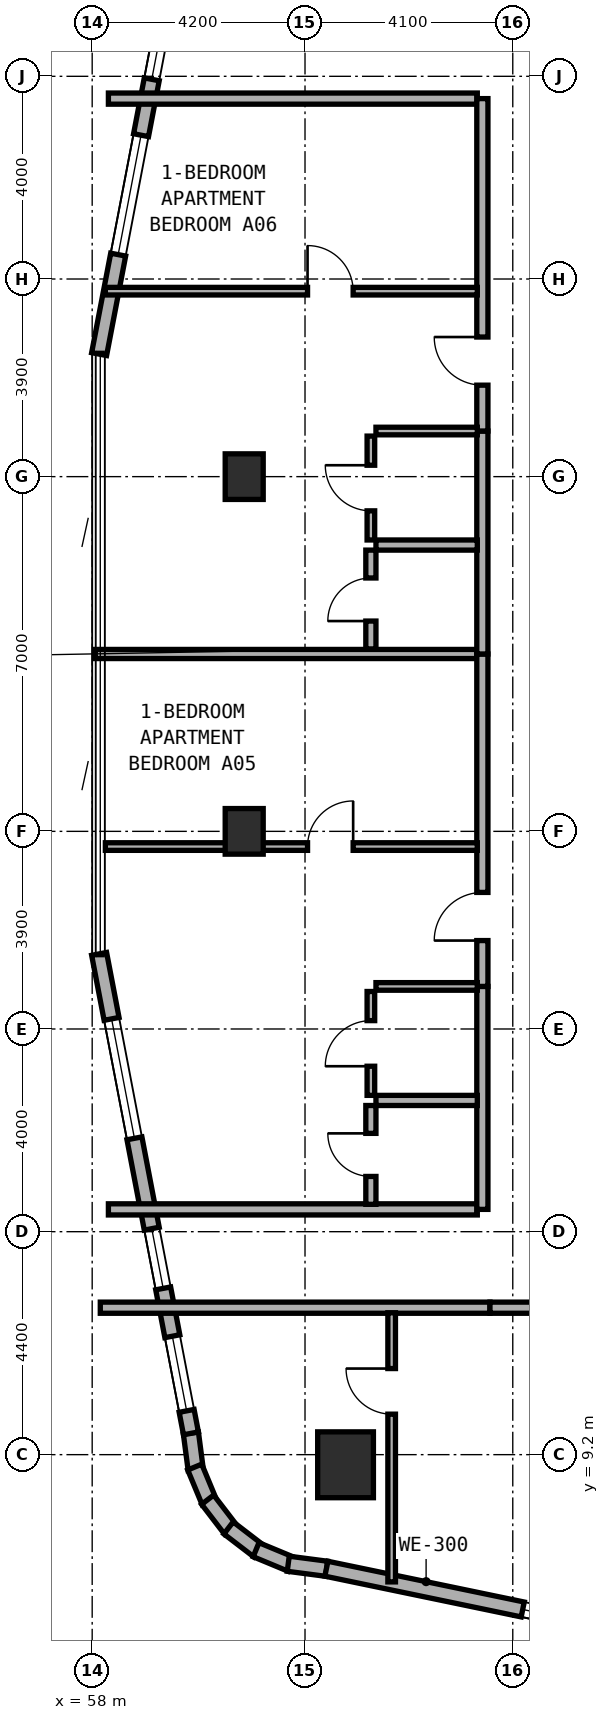
"""IFC4 building model, lengths in metres.
Left out: names, types, materials, properties, quantities, classifications, styles, units other than length and angle.
Written with IfcOpenShell. Run it as: python <this file> out.ifc"""

import sys

from ifc_helpers import new_model, si_unit, direction, frame, frame_2d, origin, origin_2d, place, context, subcontext, project, spatial, rectangle, extrude, element, fill, save


model = new_model("IFC4")
c1 = context("Model", 3, precision=1e-05, world=origin(), true_north=direction((0.0, 1.0)))
c2 = subcontext(c1, "Body", "Model", "MODEL_VIEW")
j1 = project(units=[si_unit("LENGTHUNIT", "METRE"), si_unit("PLANEANGLEUNIT", "RADIAN")], contexts=[c1])
p1 = place(None, origin())
s1 = spatial("IfcSite", under=j1, at=p1, CompositionType="ELEMENT")
p2 = place(p1, origin())
s2 = spatial("IfcBuilding", under=s1, at=p2, CompositionType="ELEMENT")
p3 = place(p2, frame((0.0, 0.0, 45.0)))
s3 = spatial("IfcBuildingStorey", under=s2, at=p3, CompositionType="ELEMENT", Elevation=45.0)
for number, where, z_axis, x_axis in (
    (1, (61.0, 21.5, 0.0), (0.0, 0.0, 1.0), (1.0, 0.0, 0.0)),
    (2, (61.0, 28.5, 0.0), (0.0, 0.0, 1.0), (1.0, 0.0, 0.0)),
):
    element("IfcColumn", number, at=place(p3, frame(where, z_axis=z_axis, x_axis=x_axis)), inside=s3, PredefinedType="COLUMN", context=c2, shape_type="SweptSolid", body=[
        extrude(rectangle(XDim=0.75, YDim=0.9, at=origin_2d()), origin(), (0.0, 0.0, 1.0), 3.5),
    ])
p4 = place(p3, frame((63.0, 9.0, 0.0), z_axis=(0.0, 0.0, 1.0), x_axis=(1.0, 0.0, 0.0)))
e3 = element("IfcColumn", 3, at=p4, inside=s3, PredefinedType="COLUMN", context=c2, shape_type="SweptSolid", body=[
    extrude(rectangle(XDim=1.1, YDim=1.3, at=origin_2d()), origin(), (0.0, 0.0, 1.0), 3.5),
])
p5 = place(p3, frame((59.948, 9.627, 0.0), z_axis=(0.0, 0.0, 1.0), x_axis=(0.130255288807, -0.991480488834, 0.0)))
e4 = element("IfcWall", 4, at=p5, inside=s3, PredefinedType="STANDARD", context=c2, shape_type="SweptSolid", body=[
    extrude(rectangle(XDim=0.729, YDim=0.3, at=frame_2d((0.365, 0.0))), origin(), (0.0, 0.0, 1.0), 3.25),
])
for number, where, z_axis, x_axis in (
    (5, (60.024, 8.955, 0.0), (0.0, 0.0, 1.0), (0.384, -0.924, 0.0)),
    (6, (60.279, 8.311, 0.0), (0.0, 0.0, 1.0), (0.608, -0.794, 0.0)),
    (7, (60.691, 7.754, 0.0), (0.0, 0.0, 1.0), (0.794, -0.608, 0.0)),
    (8, (61.234, 7.324, 0.0), (0.0, 0.0, 1.0), (0.924, -0.383, 0.0)),
):
    element("IfcWall", number, at=place(p3, frame(where, z_axis=z_axis, x_axis=x_axis)), inside=s3, PredefinedType="STANDARD", context=c2, shape_type="SweptSolid", body=[
        extrude(rectangle(XDim=0.746, YDim=0.3, at=frame_2d((0.373, 0.0))), origin(), (0.0, 0.0, 1.0), 3.25),
    ])
p6 = place(p3, frame((61.869, 7.047, 0.0), z_axis=(0.0, 0.0, 1.0), x_axis=(0.991559404866, -0.129653178221, 0.0)))
e9 = element("IfcWall", 9, at=p6, inside=s3, PredefinedType="STANDARD", context=c2, shape_type="SweptSolid", body=[
    extrude(rectangle(XDim=0.764, YDim=0.3, at=frame_2d((0.382, 0.0))), origin(), (0.0, 0.0, 1.0), 3.25),
])
p7 = place(p3, frame((62.622, 6.949, 0.0), z_axis=(0.0, 0.0, 1.0), x_axis=(0.979127260729, -0.203248142175, 0.0)))
e10 = element("IfcWall", 10, at=p7, inside=s3, PredefinedType="STANDARD", context=c2, shape_type="SweptSolid", body=[
    extrude(rectangle(XDim=8.92, YDim=0.3, at=frame_2d((4.46, 0.0))), origin(), (0.0, 0.0, 1.0), 3.25),
])
p8 = place(p7, frame((3.957, 0.0, 0.8)))
e11 = element("IfcOpeningElement", 11, at=p8, cuts=e10, PredefinedType="OPENING", context=c2, shape_type="SweptSolid", body=[
    extrude(rectangle(XDim=2.4, YDim=1.6, at=frame_2d((1.2, 0.8))), frame((0.0, 0.16, 0.0), z_axis=(0.0, -1.0, 0.0), x_axis=(1.0, 0.0, 0.0)), (0.0, 0.0, 1.0), 0.32),
])
p9 = place(p3, frame((59.949, 40.38, 0.0), z_axis=(0.0, 0.0, 1.0), x_axis=(-0.188087874316, -0.982152203854, 0.0)))
e12 = element("IfcWall", 12, at=p9, inside=s3, PredefinedType="STANDARD", context=c2, shape_type="SweptSolid", body=[
    extrude(rectangle(XDim=9.634, YDim=0.3, at=frame_2d((4.817, 0.0))), origin(), (0.0, 0.0, 1.0), 3.25),
])
p10 = place(p9, frame((0.452, 0.0, 0.85)))
e13 = element("IfcOpeningElement", 13, at=p10, cuts=e12, PredefinedType="OPENING", context=c2, shape_type="SweptSolid", body=[
    extrude(rectangle(XDim=1.5, YDim=1.5, at=frame_2d((0.75, 0.75))), frame((0.0, 0.16, 0.0), z_axis=(0.0, -1.0, 0.0), x_axis=(1.0, 0.0, 0.0)), (0.0, 0.0, 1.0), 0.32),
])
p11 = place(p9, frame((2.913, 0.0, 0.85)))
e14 = element("IfcOpeningElement", 14, at=p11, cuts=e12, PredefinedType="OPENING", context=c2, shape_type="SweptSolid", body=[
    extrude(rectangle(XDim=1.2, YDim=1.5, at=frame_2d((0.6, 0.75))), frame((0.0, 0.16, 0.0), z_axis=(0.0, -1.0, 0.0), x_axis=(1.0, 0.0, 0.0)), (0.0, 0.0, 1.0), 0.32),
])
p12 = place(p9, frame((5.235, 0.0, 0.8)))
e15 = element("IfcOpeningElement", 15, at=p12, cuts=e12, PredefinedType="OPENING", context=c2, shape_type="SweptSolid", body=[
    extrude(rectangle(XDim=2.4, YDim=1.6, at=frame_2d((1.2, 0.8))), frame((0.0, 0.16, 0.0), z_axis=(0.0, -1.0, 0.0), x_axis=(1.0, 0.0, 0.0)), (0.0, 0.0, 1.0), 0.32),
])
p13 = place(p3, frame((58.137, 19.082, 0.0), z_axis=(0.0, 0.0, 1.0), x_axis=(0.188087874316, -0.982152203854, 0.0)))
e16 = element("IfcWall", 16, at=p13, inside=s3, PredefinedType="STANDARD", context=c2, shape_type="SweptSolid", body=[
    extrude(rectangle(XDim=9.634, YDim=0.3, at=frame_2d((4.817, 0.0))), origin(), (0.0, 0.0, 1.0), 3.25),
])
p14 = place(p13, frame((1.306, 0.0, 0.8)))
e17 = element("IfcOpeningElement", 17, at=p14, cuts=e16, PredefinedType="OPENING", context=c2, shape_type="SweptSolid", body=[
    extrude(rectangle(XDim=2.4, YDim=1.6, at=frame_2d((1.2, 0.8))), frame((0.0, 0.16, 0.0), z_axis=(0.0, -1.0, 0.0), x_axis=(1.0, 0.0, 0.0)), (0.0, 0.0, 1.0), 0.32),
])
p15 = place(p13, frame((5.521, 0.0, 0.85)))
e18 = element("IfcOpeningElement", 18, at=p15, cuts=e16, PredefinedType="OPENING", context=c2, shape_type="SweptSolid", body=[
    extrude(rectangle(XDim=1.2, YDim=1.5, at=frame_2d((0.6, 0.75))), frame((0.0, 0.16, 0.0), z_axis=(0.0, -1.0, 0.0), x_axis=(1.0, 0.0, 0.0)), (0.0, 0.0, 1.0), 0.32),
])
p16 = place(p13, frame((7.682, 0.0, 0.85)))
e19 = element("IfcOpeningElement", 19, at=p16, cuts=e16, PredefinedType="OPENING", context=c2, shape_type="SweptSolid", body=[
    extrude(rectangle(XDim=1.5, YDim=1.5, at=frame_2d((0.75, 0.75))), frame((0.0, 0.16, 0.0), z_axis=(0.0, -1.0, 0.0), x_axis=(1.0, 0.0, 0.0)), (0.0, 0.0, 1.0), 0.32),
])
p17 = place(p3, frame((58.16, 12.1, 0.0), z_axis=(0.0, 0.0, 1.0), x_axis=(1.0, 0.0, 0.0)))
e20 = element("IfcWall", 20, at=p17, inside=s3, PredefinedType="SOLIDWALL", context=c2, shape_type="SweptSolid", body=[
    extrude(rectangle(XDim=7.69, YDim=0.22, at=frame_2d((3.845, 0.0))), origin(), (0.0, 0.0, 1.0), 2.865),
])
p18 = place(p3, frame((65.85, 12.1, 0.0), z_axis=(0.0, 0.0, 1.0), x_axis=(1.0, 0.0, 0.0)))
e21 = element("IfcWall", 21, at=p18, inside=s3, PredefinedType="SOLIDWALL", context=c2, shape_type="SweptSolid", body=[
    extrude(rectangle(XDim=8.87, YDim=0.22, at=frame_2d((4.435, 0.0))), origin(), (0.0, 0.0, 1.0), 2.725),
])
p19 = place(p18, frame((3.96, 0.0, 0.0)))
e22 = element("IfcOpeningElement", 22, at=p19, cuts=e21, PredefinedType="OPENING", context=c2, shape_type="SweptSolid", body=[
    extrude(rectangle(XDim=0.95, YDim=2.1, at=frame_2d((0.475, 1.05))), frame((0.0, 0.12, 0.0), z_axis=(0.0, -1.0, 0.0), x_axis=(1.0, 0.0, 0.0)), (0.0, 0.0, 1.0), 0.24),
])
p20 = place(p3, frame((63.91, 6.689, 0.0), z_axis=(0.0, 0.0, 1.0), x_axis=(0.0, 1.0, 0.0)))
e23 = element("IfcWall", 23, at=p20, inside=s3, PredefinedType="PARTITIONING", context=c2, shape_type="SweptSolid", body=[
    extrude(rectangle(XDim=5.311, YDim=0.15, at=frame_2d((2.656, 0.0))), origin(), (0.0, 0.0, 1.0), 2.865),
])
p21 = place(p20, frame((3.31, 0.0, 0.0)))
e24 = element("IfcOpeningElement", 24, at=p21, cuts=e23, PredefinedType="OPENING", context=c2, shape_type="SweptSolid", body=[
    extrude(rectangle(XDim=0.9, YDim=2.1, at=frame_2d((0.45, 1.05))), frame((0.0, 0.085, 0.0), z_axis=(0.0, -1.0, 0.0), x_axis=(1.0, 0.0, 0.0)), (0.0, 0.0, 1.0), 0.17),
])
for number, where, z_axis, x_axis in (
    (25, (58.32, 14.04, 0.0), (0.0, 0.0, 1.0), (1.0, 0.0, 0.0)),
    (26, (58.32, 35.96, 0.0), (0.0, 0.0, 1.0), (1.0, 0.0, 0.0)),
):
    element("IfcWall", number, at=place(p3, frame(where, z_axis=z_axis, x_axis=x_axis)), inside=s3, PredefinedType="SOLIDWALL", context=c2, shape_type="SweptSolid", body=[
        extrude(rectangle(XDim=7.28, YDim=0.22, at=frame_2d((3.64, 0.0))), origin(), (0.0, 0.0, 1.0), 2.865),
    ])
p22 = place(p3, frame((58.06, 25.0, 0.0), z_axis=(0.0, 0.0, 1.0), x_axis=(1.0, 0.0, 0.0)))
e27 = element("IfcWall", 27, at=p22, inside=s3, PredefinedType="SOLIDWALL", context=c2, shape_type="SweptSolid", body=[
    extrude(rectangle(XDim=7.64, YDim=0.18, at=frame_2d((3.82, 0.0))), origin(), (0.0, 0.0, 1.0), 2.865),
])
p23 = place(p3, frame((65.7, 14.04, 0.0), z_axis=(0.0, 0.0, 1.0), x_axis=(0.0, 1.0, 0.0)))
e28 = element("IfcWall", 28, at=p23, inside=s3, PredefinedType="SOLIDWALL", context=c2, shape_type="SweptSolid", body=[
    extrude(rectangle(XDim=4.4, YDim=0.22, at=frame_2d((2.2, 0.0))), origin(), (0.0, 0.0, 1.0), 3.22),
])
p24 = place(p3, frame((65.7, 18.44, 0.0), z_axis=(0.0, 0.0, 1.0), x_axis=(0.0, 1.0, 0.0)))
e29 = element("IfcWall", 29, at=p24, inside=s3, PredefinedType="SOLIDWALL", context=c2, shape_type="SweptSolid", body=[
    extrude(rectangle(XDim=6.56, YDim=0.22, at=frame_2d((3.28, 0.0))), origin(), (0.0, 0.0, 1.0), 2.725),
])
p25 = place(p24, frame((0.905, 0.0, 0.0)))
e30 = element("IfcOpeningElement", 30, at=p25, cuts=e29, PredefinedType="OPENING", context=c2, shape_type="SweptSolid", body=[
    extrude(rectangle(XDim=0.95, YDim=2.1, at=frame_2d((0.475, 1.05))), frame((0.0, 0.12, 0.0), z_axis=(0.0, -1.0, 0.0), x_axis=(1.0, 0.0, 0.0)), (0.0, 0.0, 1.0), 0.24),
])
p26 = place(p3, frame((58.26, 21.2, 0.0), z_axis=(0.0, 0.0, 1.0), x_axis=(1.0, 0.0, 0.0)))
e31 = element("IfcWall", 31, at=p26, inside=s3, PredefinedType="PARTITIONING", context=c2, shape_type="SweptSolid", body=[
    extrude(rectangle(XDim=7.34, YDim=0.15, at=frame_2d((3.67, 0.0))), origin(), (0.0, 0.0, 1.0), 2.865),
])
p27 = place(p26, frame((3.99, 0.0, 0.0)))
e32 = element("IfcOpeningElement", 32, at=p27, cuts=e31, PredefinedType="OPENING", context=c2, shape_type="SweptSolid", body=[
    extrude(rectangle(XDim=0.9, YDim=2.1, at=frame_2d((0.45, 1.05))), frame((0.0, 0.085, 0.0), z_axis=(0.0, -1.0, 0.0), x_axis=(1.0, 0.0, 0.0)), (0.0, 0.0, 1.0), 0.17),
])
p28 = place(p3, frame((63.6, 16.19, 0.0), z_axis=(0.0, 0.0, 1.0), x_axis=(1.0, 0.0, 0.0)))
e33 = element("IfcWall", 33, at=p28, inside=s3, PredefinedType="PLUMBINGWALL", context=c2, shape_type="SweptSolid", body=[
    extrude(rectangle(XDim=2.0, YDim=0.2, at=frame_2d((1.0, 0.0))), origin(), (0.0, 0.0, 1.0), 3.22),
])
p29 = place(p3, frame((63.6, 18.44, 0.0), z_axis=(0.0, 0.0, 1.0), x_axis=(1.0, 0.0, 0.0)))
e34 = element("IfcWall", 34, at=p29, inside=s3, PredefinedType="PARTITIONING", context=c2, shape_type="SweptSolid", body=[
    extrude(rectangle(XDim=2.0, YDim=0.15, at=frame_2d((1.0, 0.0))), origin(), (0.0, 0.0, 1.0), 3.22),
])
p30 = place(p3, frame((63.5, 14.14, 0.0), z_axis=(0.0, 0.0, 1.0), x_axis=(0.0, 1.0, 0.0)))
e35 = element("IfcWall", 35, at=p30, inside=s3, PredefinedType="PLUMBINGWALL", context=c2, shape_type="SweptSolid", body=[
    extrude(rectangle(XDim=1.95, YDim=0.2, at=frame_2d((0.975, 0.0))), origin(), (0.0, 0.0, 1.0), 3.22),
])
p31 = place(p30, frame((0.55, 0.0, 0.0)))
e36 = element("IfcOpeningElement", 36, at=p31, cuts=e35, PredefinedType="OPENING", context=c2, shape_type="SweptSolid", body=[
    extrude(rectangle(XDim=0.85, YDim=2.1, at=frame_2d((0.425, 1.05))), frame((0.0, 0.11, 0.0), z_axis=(0.0, -1.0, 0.0), x_axis=(1.0, 0.0, 0.0)), (0.0, 0.0, 1.0), 0.22),
])
p32 = place(p3, frame((63.5, 16.29, 0.0), z_axis=(0.0, 0.0, 1.0), x_axis=(0.0, 1.0, 0.0)))
e37 = element("IfcWall", 37, at=p32, inside=s3, PredefinedType="PARTITIONING", context=c2, shape_type="SweptSolid", body=[
    extrude(rectangle(XDim=2.05, YDim=0.15, at=frame_2d((1.025, 0.0))), origin(), (0.0, 0.0, 1.0), 3.22),
])
p33 = place(p32, frame((0.575, 0.0, 0.0)))
e38 = element("IfcOpeningElement", 38, at=p33, cuts=e37, PredefinedType="OPENING", context=c2, shape_type="SweptSolid", body=[
    extrude(rectangle(XDim=0.9, YDim=2.1, at=frame_2d((0.45, 1.05))), frame((0.0, 0.085, 0.0), z_axis=(0.0, -1.0, 0.0), x_axis=(1.0, 0.0, 0.0)), (0.0, 0.0, 1.0), 0.17),
])
p34 = place(p3, frame((65.7, 25.0, 0.0), z_axis=(0.0, 0.0, 1.0), x_axis=(0.0, 1.0, 0.0)))
e39 = element("IfcWall", 39, at=p34, inside=s3, PredefinedType="SOLIDWALL", context=c2, shape_type="SweptSolid", body=[
    extrude(rectangle(XDim=4.4, YDim=0.22, at=frame_2d((2.2, 0.0))), origin(), (0.0, 0.0, 1.0), 2.725),
])
p35 = place(p3, frame((65.7, 29.4, 0.0), z_axis=(0.0, 0.0, 1.0), x_axis=(0.0, 1.0, 0.0)))
e40 = element("IfcWall", 40, at=p35, inside=s3, PredefinedType="SOLIDWALL", context=c2, shape_type="SweptSolid", body=[
    extrude(rectangle(XDim=6.56, YDim=0.22, at=frame_2d((3.28, 0.0))), origin(), (0.0, 0.0, 1.0), 3.22),
])
p36 = place(p35, frame((0.905, 0.0, 0.0)))
e41 = element("IfcOpeningElement", 41, at=p36, cuts=e40, PredefinedType="OPENING", context=c2, shape_type="SweptSolid", body=[
    extrude(rectangle(XDim=0.95, YDim=2.1, at=frame_2d((0.475, 1.05))), frame((0.0, 0.12, 0.0), z_axis=(0.0, -1.0, 0.0), x_axis=(1.0, 0.0, 0.0)), (0.0, 0.0, 1.0), 0.24),
])
p37 = place(p3, frame((58.26, 32.16, 0.0), z_axis=(0.0, 0.0, 1.0), x_axis=(1.0, 0.0, 0.0)))
e42 = element("IfcWall", 42, at=p37, inside=s3, PredefinedType="PARTITIONING", context=c2, shape_type="SweptSolid", body=[
    extrude(rectangle(XDim=7.34, YDim=0.15, at=frame_2d((3.67, 0.0))), origin(), (0.0, 0.0, 1.0), 2.865),
])
p38 = place(p37, frame((3.99, 0.0, 0.0)))
e43 = element("IfcOpeningElement", 43, at=p38, cuts=e42, PredefinedType="OPENING", context=c2, shape_type="SweptSolid", body=[
    extrude(rectangle(XDim=0.9, YDim=2.1, at=frame_2d((0.45, 1.05))), frame((0.0, 0.085, 0.0), z_axis=(0.0, -1.0, 0.0), x_axis=(1.0, 0.0, 0.0)), (0.0, 0.0, 1.0), 0.17),
])
p39 = place(p3, frame((63.6, 27.15, 0.0), z_axis=(0.0, 0.0, 1.0), x_axis=(1.0, 0.0, 0.0)))
e44 = element("IfcWall", 44, at=p39, inside=s3, PredefinedType="PLUMBINGWALL", context=c2, shape_type="SweptSolid", body=[
    extrude(rectangle(XDim=2.0, YDim=0.2, at=frame_2d((1.0, 0.0))), origin(), (0.0, 0.0, 1.0), 3.22),
])
p40 = place(p3, frame((63.6, 29.4, 0.0), z_axis=(0.0, 0.0, 1.0), x_axis=(1.0, 0.0, 0.0)))
e45 = element("IfcWall", 45, at=p40, inside=s3, PredefinedType="PARTITIONING", context=c2, shape_type="SweptSolid", body=[
    extrude(rectangle(XDim=2.0, YDim=0.15, at=frame_2d((1.0, 0.0))), origin(), (0.0, 0.0, 1.0), 3.22),
])
p41 = place(p3, frame((63.5, 25.1, 0.0), z_axis=(0.0, 0.0, 1.0), x_axis=(0.0, 1.0, 0.0)))
e46 = element("IfcWall", 46, at=p41, inside=s3, PredefinedType="PLUMBINGWALL", context=c2, shape_type="SweptSolid", body=[
    extrude(rectangle(XDim=1.95, YDim=0.2, at=frame_2d((0.975, 0.0))), origin(), (0.0, 0.0, 1.0), 3.22),
])
p42 = place(p41, frame((0.55, 0.0, 0.0)))
e47 = element("IfcOpeningElement", 47, at=p42, cuts=e46, PredefinedType="OPENING", context=c2, shape_type="SweptSolid", body=[
    extrude(rectangle(XDim=0.85, YDim=2.1, at=frame_2d((0.425, 1.05))), frame((0.0, 0.11, 0.0), z_axis=(0.0, -1.0, 0.0), x_axis=(1.0, 0.0, 0.0)), (0.0, 0.0, 1.0), 0.22),
])
p43 = place(p3, frame((63.5, 27.25, 0.0), z_axis=(0.0, 0.0, 1.0), x_axis=(0.0, 1.0, 0.0)))
e48 = element("IfcWall", 48, at=p43, inside=s3, PredefinedType="PARTITIONING", context=c2, shape_type="SweptSolid", body=[
    extrude(rectangle(XDim=2.05, YDim=0.15, at=frame_2d((1.025, 0.0))), origin(), (0.0, 0.0, 1.0), 2.725),
])
p44 = place(p43, frame((0.575, 0.0, 0.0)))
e49 = element("IfcOpeningElement", 49, at=p44, cuts=e48, PredefinedType="OPENING", context=c2, shape_type="SweptSolid", body=[
    extrude(rectangle(XDim=0.9, YDim=2.1, at=frame_2d((0.45, 1.05))), frame((0.0, 0.085, 0.0), z_axis=(0.0, -1.0, 0.0), x_axis=(1.0, 0.0, 0.0)), (0.0, 0.0, 1.0), 0.17),
])
p45 = place(p8, origin())
e50 = element("IfcWindow", 50, at=p45, inside=s3, PartitioningType="SINGLE_PANEL", PredefinedType="WINDOW", context=c2, shape_type="SweptSolid", body=[
    extrude(rectangle(XDim=2.4, YDim=1.6, at=frame_2d((1.2, 0.8))), frame((0.0, 0.03, 0.0), z_axis=(0.0, -1.0, 0.0), x_axis=(1.0, 0.0, 0.0)), (0.0, 0.0, 1.0), 0.06),
])
fill(e11, e50)
p46 = place(p11, origin())
e51 = element("IfcWindow", 51, at=p46, inside=s3, PartitioningType="SINGLE_PANEL", PredefinedType="WINDOW", context=c2, shape_type="SweptSolid", body=[
    extrude(rectangle(XDim=1.2, YDim=1.5, at=frame_2d((0.6, 0.75))), frame((0.0, 0.03, 0.0), z_axis=(0.0, -1.0, 0.0), x_axis=(1.0, 0.0, 0.0)), (0.0, 0.0, 1.0), 0.06),
])
fill(e14, e51)
p47 = place(p12, origin())
e52 = element("IfcWindow", 52, at=p47, inside=s3, PartitioningType="SINGLE_PANEL", PredefinedType="WINDOW", context=c2, shape_type="SweptSolid", body=[
    extrude(rectangle(XDim=2.4, YDim=1.6, at=frame_2d((1.2, 0.8))), frame((0.0, 0.03, 0.0), z_axis=(0.0, -1.0, 0.0), x_axis=(1.0, 0.0, 0.0)), (0.0, 0.0, 1.0), 0.06),
])
fill(e15, e52)
p48 = place(p14, origin())
e53 = element("IfcWindow", 53, at=p48, inside=s3, PartitioningType="SINGLE_PANEL", PredefinedType="WINDOW", context=c2, shape_type="SweptSolid", body=[
    extrude(rectangle(XDim=2.4, YDim=1.6, at=frame_2d((1.2, 0.8))), frame((0.0, 0.03, 0.0), z_axis=(0.0, -1.0, 0.0), x_axis=(1.0, 0.0, 0.0)), (0.0, 0.0, 1.0), 0.06),
])
fill(e17, e53)
p49 = place(p15, origin())
e54 = element("IfcWindow", 54, at=p49, inside=s3, PartitioningType="SINGLE_PANEL", PredefinedType="WINDOW", context=c2, shape_type="SweptSolid", body=[
    extrude(rectangle(XDim=1.2, YDim=1.5, at=frame_2d((0.6, 0.75))), frame((0.0, 0.03, 0.0), z_axis=(0.0, -1.0, 0.0), x_axis=(1.0, 0.0, 0.0)), (0.0, 0.0, 1.0), 0.06),
])
fill(e18, e54)
p50 = place(p16, origin())
e55 = element("IfcWindow", 55, at=p50, inside=s3, PartitioningType="SINGLE_PANEL", PredefinedType="WINDOW", context=c2, shape_type="SweptSolid", body=[
    extrude(rectangle(XDim=1.5, YDim=1.5, at=frame_2d((0.75, 0.75))), frame((0.0, 0.03, 0.0), z_axis=(0.0, -1.0, 0.0), x_axis=(1.0, 0.0, 0.0)), (0.0, 0.0, 1.0), 0.06),
])
fill(e19, e55)
p51 = place(p21, origin())
e56 = element("IfcDoor", 56, at=p51, inside=s3, OperationType="SINGLE_SWING_RIGHT", PredefinedType="DOOR", context=c2, shape_type="SweptSolid", body=[
    extrude(rectangle(XDim=0.9, YDim=2.1, at=frame_2d((0.45, 1.05))), frame((0.0, 0.025, 0.0), z_axis=(0.0, -1.0, 0.0), x_axis=(1.0, 0.0, 0.0)), (0.0, 0.0, 1.0), 0.05),
])
fill(e24, e56)
p52 = place(p25, origin())
e57 = element("IfcDoor", 57, at=p52, inside=s3, OperationType="SINGLE_SWING_LEFT", PredefinedType="DOOR", context=c2, shape_type="SweptSolid", body=[
    extrude(rectangle(XDim=0.95, YDim=2.1, at=frame_2d((0.475, 1.05))), frame((0.0, 0.025, 0.0), z_axis=(0.0, -1.0, 0.0), x_axis=(1.0, 0.0, 0.0)), (0.0, 0.0, 1.0), 0.05),
])
fill(e30, e57)
p53 = place(p27, origin())
e58 = element("IfcDoor", 58, at=p53, inside=s3, OperationType="SINGLE_SWING_RIGHT", PredefinedType="DOOR", context=c2, shape_type="SweptSolid", body=[
    extrude(rectangle(XDim=0.9, YDim=2.1, at=frame_2d((0.45, 1.05))), frame((0.0, 0.025, 0.0), z_axis=(0.0, -1.0, 0.0), x_axis=(1.0, 0.0, 0.0)), (0.0, 0.0, 1.0), 0.05),
])
fill(e32, e58)
p54 = place(p31, origin())
e59 = element("IfcDoor", 59, at=p54, inside=s3, OperationType="SINGLE_SWING_RIGHT", PredefinedType="DOOR", context=c2, shape_type="SweptSolid", body=[
    extrude(rectangle(XDim=0.85, YDim=2.1, at=frame_2d((0.425, 1.05))), frame((0.0, 0.025, 0.0), z_axis=(0.0, -1.0, 0.0), x_axis=(1.0, 0.0, 0.0)), (0.0, 0.0, 1.0), 0.05),
])
fill(e36, e59)
p55 = place(p33, origin())
e60 = element("IfcDoor", 60, at=p55, inside=s3, OperationType="SINGLE_SWING_LEFT", PredefinedType="DOOR", context=c2, shape_type="SweptSolid", body=[
    extrude(rectangle(XDim=0.9, YDim=2.1, at=frame_2d((0.45, 1.05))), frame((0.0, 0.025, 0.0), z_axis=(0.0, -1.0, 0.0), x_axis=(1.0, 0.0, 0.0)), (0.0, 0.0, 1.0), 0.05),
])
fill(e38, e60)
p56 = place(p36, origin())
e61 = element("IfcDoor", 61, at=p56, inside=s3, OperationType="SINGLE_SWING_RIGHT", PredefinedType="DOOR", context=c2, shape_type="SweptSolid", body=[
    extrude(rectangle(XDim=0.95, YDim=2.1, at=frame_2d((0.475, 1.05))), frame((0.0, 0.025, 0.0), z_axis=(0.0, -1.0, 0.0), x_axis=(1.0, 0.0, 0.0)), (0.0, 0.0, 1.0), 0.05),
])
fill(e41, e61)
p57 = place(p38, origin())
e62 = element("IfcDoor", 62, at=p57, inside=s3, OperationType="SINGLE_SWING_LEFT", PredefinedType="DOOR", context=c2, shape_type="SweptSolid", body=[
    extrude(rectangle(XDim=0.9, YDim=2.1, at=frame_2d((0.45, 1.05))), frame((0.0, 0.025, 0.0), z_axis=(0.0, -1.0, 0.0), x_axis=(1.0, 0.0, 0.0)), (0.0, 0.0, 1.0), 0.05),
])
fill(e43, e62)
p58 = place(p42, origin())
e63 = element("IfcDoor", 63, at=p58, inside=s3, OperationType="SINGLE_SWING_LEFT", PredefinedType="DOOR", context=c2, shape_type="SweptSolid", body=[
    extrude(rectangle(XDim=0.85, YDim=2.1, at=frame_2d((0.425, 1.05))), frame((0.0, 0.025, 0.0), z_axis=(0.0, -1.0, 0.0), x_axis=(1.0, 0.0, 0.0)), (0.0, 0.0, 1.0), 0.05),
])
fill(e47, e63)
p59 = place(p44, origin())
e64 = element("IfcDoor", 64, at=p59, inside=s3, OperationType="SINGLE_SWING_RIGHT", PredefinedType="DOOR", context=c2, shape_type="SweptSolid", body=[
    extrude(rectangle(XDim=0.9, YDim=2.1, at=frame_2d((0.45, 1.05))), frame((0.0, 0.025, 0.0), z_axis=(0.0, -1.0, 0.0), x_axis=(1.0, 0.0, 0.0)), (0.0, 0.0, 1.0), 0.05),
])
fill(e49, e64)
save(model, sys.argv[1])
